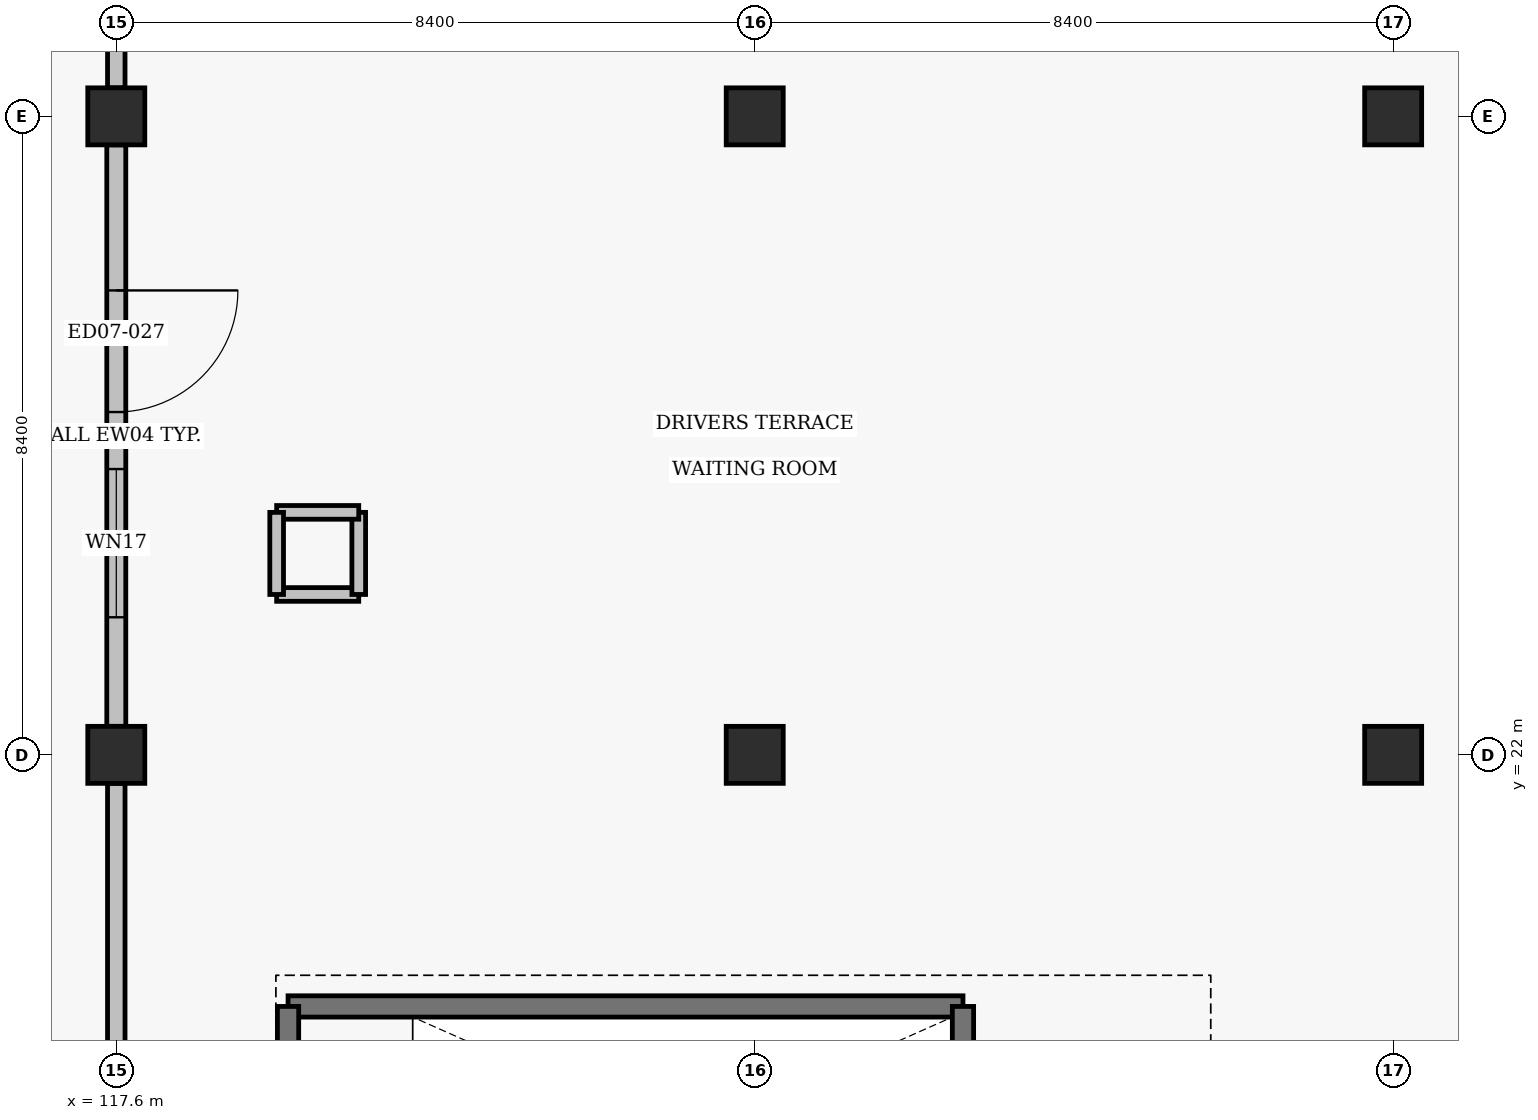
"""IFC4 building model, lengths in metres.
Left out: names, types, materials, properties, quantities, classifications, styles, units other than length and angle.
Written with IfcOpenShell. Run it as: python <this file> out.ifc"""

import sys

from ifc_helpers import new_model, si_unit, direction, frame, frame_2d, origin, origin_2d, place, context, subcontext, project, spatial, rectangle, extrude, element, fill, save


model = new_model("IFC4")
c1 = context("Model", 3, precision=1e-05, world=origin(), true_north=direction((0.0, 1.0)))
c2 = subcontext(c1, "Body", "Model", "MODEL_VIEW")
j1 = project(units=[si_unit("LENGTHUNIT", "METRE"), si_unit("PLANEANGLEUNIT", "RADIAN")], contexts=[c1])
p1 = place(None, origin())
s1 = spatial("IfcSite", under=j1, at=p1, CompositionType="ELEMENT")
p2 = place(p1, origin())
s2 = spatial("IfcBuilding", under=s1, at=p2, CompositionType="ELEMENT")
p3 = place(p2, frame((0.0, 0.0, 9.6)))
s3 = spatial("IfcBuildingStorey", under=s2, at=p3, CompositionType="ELEMENT", Elevation=9.6)
for number, where, z_axis, x_axis in (
    (1, (117.6, 22.0, 0.0), (0.0, 0.0, 1.0), (1.0, 0.0, 0.0)),
    (2, (117.6, 30.4, 0.0), (0.0, 0.0, 1.0), (1.0, 0.0, 0.0)),
    (3, (126.0, 22.0, 0.0), (0.0, 0.0, 1.0), (1.0, 0.0, 0.0)),
    (4, (126.0, 30.4, 0.0), (0.0, 0.0, 1.0), (1.0, 0.0, 0.0)),
    (5, (134.4, 22.0, 0.0), (0.0, 0.0, 1.0), (1.0, 0.0, 0.0)),
    (6, (134.4, 30.4, 0.0), (0.0, 0.0, 1.0), (1.0, 0.0, 0.0)),
):
    element("IfcColumn", number, at=place(p3, frame(where, z_axis=z_axis, x_axis=x_axis)), inside=s3, PredefinedType="COLUMN", context=c2, shape_type="SweptSolid", body=[
        extrude(rectangle(XDim=0.75, YDim=0.75, at=origin_2d()), origin(), (0.0, 0.0, 1.0), 3.52),
    ])
p4 = place(p3, frame((117.6, 30.025, 0.0), z_axis=(0.0, 0.0, 1.0), x_axis=(0.0, -1.0, 0.0)))
e7 = element("IfcWall", 7, at=p4, inside=s3, PredefinedType="SOLIDWALL", context=c2, shape_type="SweptSolid", body=[
    extrude(rectangle(XDim=7.65, YDim=0.25, at=frame_2d((3.825, 0.0))), origin(), (0.0, 0.0, 1.0), 2.585),
])
p5 = place(p4, frame((1.915, 0.0, 0.0)))
e8 = element("IfcOpeningElement", 8, at=p5, cuts=e7, PredefinedType="OPENING", context=c2, shape_type="SweptSolid", body=[
    extrude(rectangle(XDim=1.6, YDim=2.1, at=frame_2d((0.8, 1.05))), frame((0.0, 0.135, 0.0), z_axis=(0.0, -1.0, 0.0), x_axis=(1.0, 0.0, 0.0)), (0.0, 0.0, 1.0), 0.27),
])
p6 = place(p4, frame((4.265, 0.0, 0.9)))
e9 = element("IfcOpeningElement", 9, at=p6, cuts=e7, PredefinedType="OPENING", context=c2, shape_type="SweptSolid", body=[
    extrude(rectangle(XDim=1.95, YDim=1.4, at=frame_2d((0.975, 0.7))), frame((0.0, 0.135, 0.0), z_axis=(0.0, -1.0, 0.0), x_axis=(1.0, 0.0, 0.0)), (0.0, 0.0, 1.0), 0.27),
])
p7 = place(p3, frame((117.6, 14.375, 0.0), z_axis=(0.0, 0.0, 1.0), x_axis=(0.0, 1.0, 0.0)))
e10 = element("IfcWall", 10, at=p7, inside=s3, PredefinedType="PARAPET", context=c2, shape_type="SweptSolid", body=[
    extrude(rectangle(XDim=7.25, YDim=0.23, at=frame_2d((3.625, 0.0))), origin(), (0.0, 0.0, 1.0), 1.15),
])
p8 = place(p3, frame((117.6, 30.775, 0.0), z_axis=(0.0, 0.0, 1.0), x_axis=(0.0, 1.0, 0.0)))
e11 = element("IfcWall", 11, at=p8, inside=s3, PredefinedType="PARAPET", context=c2, shape_type="SweptSolid", body=[
    extrude(rectangle(XDim=7.65, YDim=0.23, at=frame_2d((3.825, 0.0))), origin(), (0.0, 0.0, 1.0), 1.15),
])
p9 = place(p3, frame((119.86, 18.69, 0.0), z_axis=(0.0, 0.0, 1.0), x_axis=(1.0, 0.0, 0.0)))
e12 = element("IfcWall", 12, at=p9, inside=s3, PredefinedType="SHEAR", context=c2, shape_type="SweptSolid", body=[
    extrude(rectangle(XDim=8.88, YDim=0.28, at=frame_2d((4.44, 0.0))), origin(), (0.0, 0.0, 1.0), 3.52),
])
p10 = place(p3, frame((119.86, 18.69, 0.0), z_axis=(0.0, 0.0, 1.0), x_axis=(0.0, -1.0, 0.0)))
e13 = element("IfcWall", 13, at=p10, inside=s3, PredefinedType="SHEAR", context=c2, shape_type="SweptSolid", body=[
    extrude(rectangle(XDim=3.43, YDim=0.28, at=frame_2d((1.715, 0.0))), origin(), (0.0, 0.0, 1.0), 3.52),
])
p11 = place(p10, frame((1.035, 0.0, 0.0)))
e14 = element("IfcOpeningElement", 14, at=p11, cuts=e13, PredefinedType="OPENING", context=c2, shape_type="SweptSolid", body=[
    extrude(rectangle(XDim=1.36, YDim=2.15, at=frame_2d((0.68, 1.075))), frame((0.0, 0.15, 0.0), z_axis=(0.0, -1.0, 0.0), x_axis=(1.0, 0.0, 0.0)), (0.0, 0.0, 1.0), 0.3),
])
p12 = place(p3, frame((128.74, 15.26, 0.0), z_axis=(0.0, 0.0, 1.0), x_axis=(0.0, 1.0, 0.0)))
e15 = element("IfcWall", 15, at=p12, inside=s3, PredefinedType="SHEAR", context=c2, shape_type="SweptSolid", body=[
    extrude(rectangle(XDim=3.43, YDim=0.28, at=frame_2d((1.715, 0.0))), origin(), (0.0, 0.0, 1.0), 3.52),
])
p13 = place(p3, frame((119.71, 24.11, 0.0), z_axis=(0.0, 0.0, 1.0), x_axis=(1.0, 0.0, 0.0)))
e16 = element("IfcWall", 16, at=p13, inside=s3, PredefinedType="SOLIDWALL", context=c2, shape_type="SweptSolid", body=[
    extrude(rectangle(XDim=1.08, YDim=0.18, at=frame_2d((0.54, 0.0))), origin(), (0.0, 0.0, 1.0), 2.6),
])
p14 = place(p3, frame((120.79, 24.11, 0.0), z_axis=(0.0, 0.0, 1.0), x_axis=(0.0, 1.0, 0.0)))
e17 = element("IfcWall", 17, at=p14, inside=s3, PredefinedType="SOLIDWALL", context=c2, shape_type="SweptSolid", body=[
    extrude(rectangle(XDim=1.08, YDim=0.18, at=frame_2d((0.54, 0.0))), origin(), (0.0, 0.0, 1.0), 2.6),
])
p15 = place(p3, frame((120.79, 25.19, 0.0), z_axis=(0.0, 0.0, 1.0), x_axis=(-1.0, 0.0, 0.0)))
e18 = element("IfcWall", 18, at=p15, inside=s3, PredefinedType="SOLIDWALL", context=c2, shape_type="SweptSolid", body=[
    extrude(rectangle(XDim=1.08, YDim=0.18, at=frame_2d((0.54, 0.0))), origin(), (0.0, 0.0, 1.0), 2.6),
])
p16 = place(p3, frame((119.71, 25.19, 0.0), z_axis=(0.0, 0.0, 1.0), x_axis=(0.0, -1.0, 0.0)))
e19 = element("IfcWall", 19, at=p16, inside=s3, PredefinedType="SOLIDWALL", context=c2, shape_type="SweptSolid", body=[
    extrude(rectangle(XDim=1.08, YDim=0.18, at=frame_2d((0.54, 0.0))), origin(), (0.0, 0.0, 1.0), 2.6),
])
p17 = place(p5, origin())
e20 = element("IfcDoor", 20, at=p17, inside=s3, OperationType="SINGLE_SWING_LEFT", PredefinedType="DOOR", context=c2, shape_type="SweptSolid", body=[
    extrude(rectangle(XDim=1.6, YDim=2.1, at=frame_2d((0.8, 1.05))), frame((0.0, 0.025, 0.0), z_axis=(0.0, -1.0, 0.0), x_axis=(1.0, 0.0, 0.0)), (0.0, 0.0, 1.0), 0.05),
])
fill(e8, e20)
p18 = place(p6, origin())
e21 = element("IfcWindow", 21, at=p18, inside=s3, PartitioningType="DOUBLE_PANEL_VERTICAL", PredefinedType="WINDOW", context=c2, shape_type="SweptSolid", body=[
    extrude(rectangle(XDim=1.95, YDim=1.4, at=frame_2d((0.975, 0.7))), frame((0.0, 0.03, 0.0), z_axis=(0.0, -1.0, 0.0), x_axis=(1.0, 0.0, 0.0)), (0.0, 0.0, 1.0), 0.06),
])
fill(e9, e21)
save(model, sys.argv[1])
